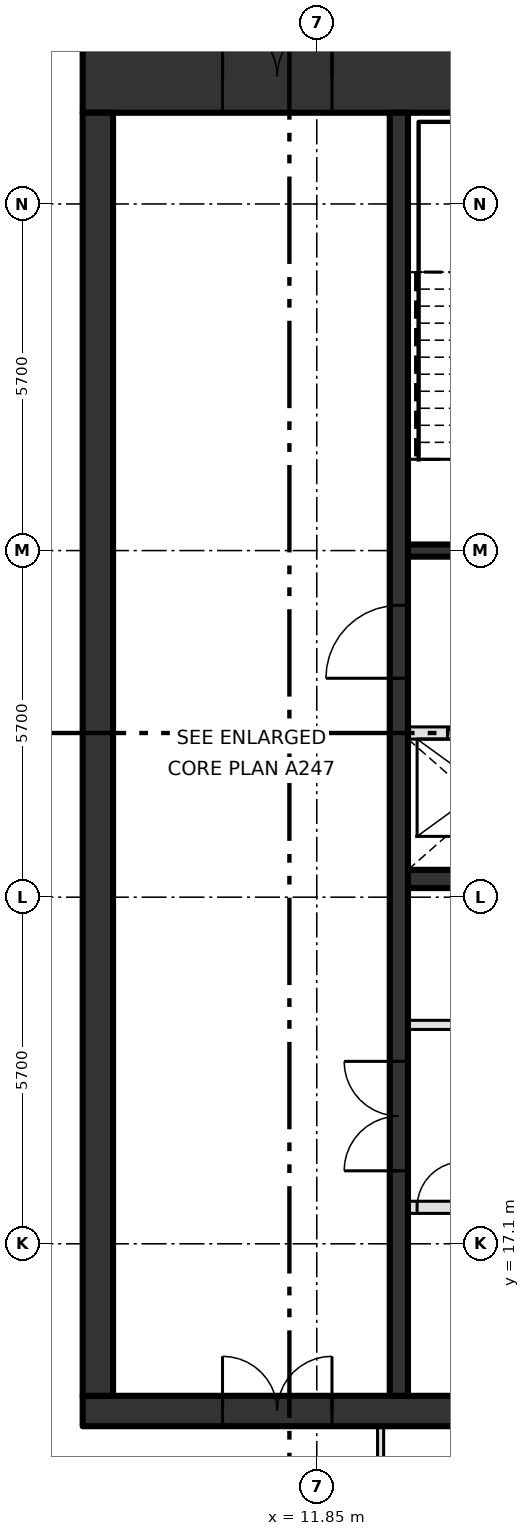
"""IFC4 building model, lengths in metres.
Left out: names, types, materials, properties, quantities, classifications, styles, units other than length and angle.
Written with IfcOpenShell. Run it as: python <this file> out.ifc"""

import sys

from ifc_helpers import new_model, si_unit, direction, frame, frame_2d, origin, place, context, subcontext, project, spatial, rectangle, extrude, element, fill, save


model = new_model("IFC4")
c1 = context("Model", 3, precision=1e-05, world=origin(), true_north=direction((0.0, 1.0)))
c2 = subcontext(c1, "Body", "Model", "MODEL_VIEW")
j1 = project(units=[si_unit("LENGTHUNIT", "METRE"), si_unit("PLANEANGLEUNIT", "RADIAN")], contexts=[c1])
p1 = place(None, origin())
s1 = spatial("IfcSite", under=j1, at=p1, CompositionType="ELEMENT")
p2 = place(p1, origin())
s2 = spatial("IfcBuilding", under=s1, at=p2, CompositionType="ELEMENT")
p3 = place(p2, frame((0.0, 0.0, 358.2)))
s3 = spatial("IfcBuildingStorey", under=s2, at=p3, CompositionType="ELEMENT", Elevation=358.2)
p4 = place(p3, frame((8.0, 14.35, -0.3), z_axis=(0.0, 0.0, 1.0), x_axis=(1.0, 0.0, 0.0)))
e1 = element("IfcWall", 1, at=p4, inside=s3, PredefinedType="SHEAR", context=c2, shape_type="SweptSolid", body=[
    extrude(rectangle(XDim=22.8, YDim=0.5, at=frame_2d((11.4, 0.0))), origin(), (0.0, 0.0, 1.0), 4.2),
])
p5 = place(p4, frame((2.3, 0.0, 0.3)))
e2 = element("IfcOpeningElement", 2, at=p5, cuts=e1, PredefinedType="OPENING", context=c2, shape_type="SweptSolid", body=[
    extrude(rectangle(XDim=1.8, YDim=2.1, at=frame_2d((0.9, 1.05))), frame((0.0, 0.26, 0.0), z_axis=(0.0, -1.0, 0.0), x_axis=(1.0, 0.0, 0.0)), (0.0, 0.0, 1.0), 0.52),
])
p6 = place(p3, frame((8.0, 36.3, -0.3), z_axis=(0.0, 0.0, 1.0), x_axis=(1.0, 0.0, 0.0)))
e3 = element("IfcWall", 3, at=p6, inside=s3, PredefinedType="SHEAR", context=c2, shape_type="SweptSolid", body=[
    extrude(rectangle(XDim=22.8, YDim=1.2, at=frame_2d((11.4, 0.0))), origin(), (0.0, 0.0, 1.0), 4.2),
])
p7 = place(p6, frame((2.3, 0.0, 0.3)))
e4 = element("IfcOpeningElement", 4, at=p7, cuts=e3, PredefinedType="OPENING", context=c2, shape_type="SweptSolid", body=[
    extrude(rectangle(XDim=1.8, YDim=2.1, at=frame_2d((0.9, 1.05))), frame((0.0, 0.61, 0.0), z_axis=(0.0, -1.0, 0.0), x_axis=(1.0, 0.0, 0.0)), (0.0, 0.0, 1.0), 1.22),
])
p8 = place(p3, frame((8.25, 14.6, -0.3), z_axis=(0.0, 0.0, 1.0), x_axis=(0.0, 1.0, 0.0)))
e5 = element("IfcWall", 5, at=p8, inside=s3, PredefinedType="SHEAR", context=c2, shape_type="SweptSolid", body=[
    extrude(rectangle(XDim=21.1, YDim=0.5, at=frame_2d((10.55, 0.0))), origin(), (0.0, 0.0, 1.0), 4.2),
])
p9 = place(p3, frame((13.35, 17.7, 0.0), z_axis=(0.0, 0.0, 1.0), x_axis=(1.0, 0.0, 0.0)))
e6 = element("IfcWall", 6, at=p9, inside=s3, PredefinedType="SOLIDWALL", context=c2, shape_type="SweptSolid", body=[
    extrude(rectangle(XDim=13.425, YDim=0.2, at=frame_2d((6.712, 0.0))), origin(), (0.0, 0.0, 1.0), 3.9),
])
p10 = place(p9, frame((2.0, 0.0, 0.0)))
e7 = element("IfcOpeningElement", 7, at=p10, cuts=e6, PredefinedType="OPENING", context=c2, shape_type="SweptSolid", body=[
    extrude(rectangle(XDim=1.1, YDim=2.1, at=frame_2d((0.55, 1.05))), frame((0.0, 0.11, 0.0), z_axis=(0.0, -1.0, 0.0), x_axis=(1.0, 0.0, 0.0)), (0.0, 0.0, 1.0), 0.22),
])
p11 = place(p9, frame((4.7, 0.0, 0.0)))
e8 = element("IfcOpeningElement", 8, at=p11, cuts=e6, PredefinedType="OPENING", context=c2, shape_type="SweptSolid", body=[
    extrude(rectangle(XDim=1.1, YDim=2.1, at=frame_2d((0.55, 1.05))), frame((0.0, 0.11, 0.0), z_axis=(0.0, -1.0, 0.0), x_axis=(1.0, 0.0, 0.0)), (0.0, 0.0, 1.0), 0.22),
])
p12 = place(p9, frame((7.4, 0.0, 0.0)))
e9 = element("IfcOpeningElement", 9, at=p12, cuts=e6, PredefinedType="OPENING", context=c2, shape_type="SweptSolid", body=[
    extrude(rectangle(XDim=1.1, YDim=2.1, at=frame_2d((0.55, 1.05))), frame((0.0, 0.11, 0.0), z_axis=(0.0, -1.0, 0.0), x_axis=(1.0, 0.0, 0.0)), (0.0, 0.0, 1.0), 0.22),
])
p13 = place(p9, frame((10.1, 0.0, 0.0)))
e10 = element("IfcOpeningElement", 10, at=p13, cuts=e6, PredefinedType="OPENING", context=c2, shape_type="SweptSolid", body=[
    extrude(rectangle(XDim=1.1, YDim=2.1, at=frame_2d((0.55, 1.05))), frame((0.0, 0.11, 0.0), z_axis=(0.0, -1.0, 0.0), x_axis=(1.0, 0.0, 0.0)), (0.0, 0.0, 1.0), 0.22),
])
p14 = place(p9, frame((0.15, 0.0, 0.0)))
e11 = element("IfcOpeningElement", 11, at=p14, cuts=e6, PredefinedType="OPENING", context=c2, shape_type="SweptSolid", body=[
    extrude(rectangle(XDim=0.75, YDim=2.1, at=frame_2d((0.375, 1.05))), frame((0.0, 0.11, 0.0), z_axis=(0.0, -1.0, 0.0), x_axis=(1.0, 0.0, 0.0)), (0.0, 0.0, 1.0), 0.22),
])
p15 = place(p9, frame((12.3, 0.0, 0.0)))
e12 = element("IfcOpeningElement", 12, at=p15, cuts=e6, PredefinedType="OPENING", context=c2, shape_type="SweptSolid", body=[
    extrude(rectangle(XDim=0.75, YDim=2.1, at=frame_2d((0.375, 1.05))), frame((0.0, 0.11, 0.0), z_axis=(0.0, -1.0, 0.0), x_axis=(1.0, 0.0, 0.0)), (0.0, 0.0, 1.0), 0.22),
])
p16 = place(p3, frame((13.35, 20.7, 0.0), z_axis=(0.0, 0.0, 1.0), x_axis=(1.0, 0.0, 0.0)))
e13 = element("IfcWall", 13, at=p16, inside=s3, PredefinedType="PARTITIONING", context=c2, shape_type="SweptSolid", body=[
    extrude(rectangle(XDim=13.425, YDim=0.15, at=frame_2d((6.712, 0.0))), origin(), (0.0, 0.0, 1.0), 3.9),
])
p17 = place(p16, frame((0.75, 0.0, 0.0)))
e14 = element("IfcOpeningElement", 14, at=p17, cuts=e13, PredefinedType="OPENING", context=c2, shape_type="SweptSolid", body=[
    extrude(rectangle(XDim=0.9, YDim=2.1, at=frame_2d((0.45, 1.05))), frame((0.0, 0.085, 0.0), z_axis=(0.0, -1.0, 0.0), x_axis=(1.0, 0.0, 0.0)), (0.0, 0.0, 1.0), 0.17),
])
p18 = place(p16, frame((7.5, 0.0, 0.0)))
e15 = element("IfcOpeningElement", 15, at=p18, cuts=e13, PredefinedType="OPENING", context=c2, shape_type="SweptSolid", body=[
    extrude(rectangle(XDim=0.9, YDim=2.1, at=frame_2d((0.45, 1.05))), frame((0.0, 0.085, 0.0), z_axis=(0.0, -1.0, 0.0), x_axis=(1.0, 0.0, 0.0)), (0.0, 0.0, 1.0), 0.17),
])
p19 = place(p3, frame((13.35, 23.1, 0.0), z_axis=(0.0, 0.0, 1.0), x_axis=(1.0, 0.0, 0.0)))
e16 = element("IfcWall", 16, at=p19, inside=s3, PredefinedType="SHEAR", context=c2, shape_type="SweptSolid", body=[
    extrude(rectangle(XDim=16.95, YDim=0.3, at=frame_2d((8.475, 0.0))), origin(), (0.0, 0.0, 1.0), 3.9),
])
p20 = place(p3, frame((13.35, 25.5, 0.0), z_axis=(0.0, 0.0, 1.0), x_axis=(1.0, 0.0, 0.0)))
e17 = element("IfcWall", 17, at=p20, inside=s3, PredefinedType="SOLIDWALL", context=c2, shape_type="SweptSolid", body=[
    extrude(rectangle(XDim=16.95, YDim=0.2, at=frame_2d((8.475, 0.0))), origin(), (0.0, 0.0, 1.0), 3.9),
])
p21 = place(p20, frame((0.65, 0.0, 0.0)))
e18 = element("IfcOpeningElement", 18, at=p21, cuts=e17, PredefinedType="OPENING", context=c2, shape_type="SweptSolid", body=[
    extrude(rectangle(XDim=1.1, YDim=2.1, at=frame_2d((0.55, 1.05))), frame((0.0, 0.11, 0.0), z_axis=(0.0, -1.0, 0.0), x_axis=(1.0, 0.0, 0.0)), (0.0, 0.0, 1.0), 0.22),
])
p22 = place(p20, frame((3.35, 0.0, 0.0)))
e19 = element("IfcOpeningElement", 19, at=p22, cuts=e17, PredefinedType="OPENING", context=c2, shape_type="SweptSolid", body=[
    extrude(rectangle(XDim=1.1, YDim=2.1, at=frame_2d((0.55, 1.05))), frame((0.0, 0.11, 0.0), z_axis=(0.0, -1.0, 0.0), x_axis=(1.0, 0.0, 0.0)), (0.0, 0.0, 1.0), 0.22),
])
p23 = place(p20, frame((6.05, 0.0, 0.0)))
e20 = element("IfcOpeningElement", 20, at=p23, cuts=e17, PredefinedType="OPENING", context=c2, shape_type="SweptSolid", body=[
    extrude(rectangle(XDim=1.1, YDim=2.1, at=frame_2d((0.55, 1.05))), frame((0.0, 0.11, 0.0), z_axis=(0.0, -1.0, 0.0), x_axis=(1.0, 0.0, 0.0)), (0.0, 0.0, 1.0), 0.22),
])
p24 = place(p20, frame((8.75, 0.0, 0.0)))
e21 = element("IfcOpeningElement", 21, at=p24, cuts=e17, PredefinedType="OPENING", context=c2, shape_type="SweptSolid", body=[
    extrude(rectangle(XDim=1.1, YDim=2.1, at=frame_2d((0.55, 1.05))), frame((0.0, 0.11, 0.0), z_axis=(0.0, -1.0, 0.0), x_axis=(1.0, 0.0, 0.0)), (0.0, 0.0, 1.0), 0.22),
])
p25 = place(p20, frame((13.0, 0.0, 0.0)))
e22 = element("IfcOpeningElement", 22, at=p25, cuts=e17, PredefinedType="OPENING", context=c2, shape_type="SweptSolid", body=[
    extrude(rectangle(XDim=0.9, YDim=2.1, at=frame_2d((0.45, 1.05))), frame((0.0, 0.11, 0.0), z_axis=(0.0, -1.0, 0.0), x_axis=(1.0, 0.0, 0.0)), (0.0, 0.0, 1.0), 0.22),
])
p26 = place(p3, frame((13.35, 28.5, 0.0), z_axis=(0.0, 0.0, 1.0), x_axis=(1.0, 0.0, 0.0)))
e23 = element("IfcWall", 23, at=p26, inside=s3, PredefinedType="SOLIDWALL", context=c2, shape_type="SweptSolid", body=[
    extrude(rectangle(XDim=6.75, YDim=0.2, at=frame_2d((3.375, 0.0))), origin(), (0.0, 0.0, 1.0), 3.9),
])
p27 = place(p26, frame((0.95, 0.0, 0.0)))
e24 = element("IfcOpeningElement", 24, at=p27, cuts=e23, PredefinedType="OPENING", context=c2, shape_type="SweptSolid", body=[
    extrude(rectangle(XDim=1.2, YDim=2.1, at=frame_2d((0.6, 1.05))), frame((0.0, 0.11, 0.0), z_axis=(0.0, -1.0, 0.0), x_axis=(1.0, 0.0, 0.0)), (0.0, 0.0, 1.0), 0.22),
])
p28 = place(p26, frame((3.75, 0.0, 0.0)))
e25 = element("IfcOpeningElement", 25, at=p28, cuts=e23, PredefinedType="OPENING", context=c2, shape_type="SweptSolid", body=[
    extrude(rectangle(XDim=1.1, YDim=2.1, at=frame_2d((0.55, 1.05))), frame((0.0, 0.11, 0.0), z_axis=(0.0, -1.0, 0.0), x_axis=(1.0, 0.0, 0.0)), (0.0, 0.0, 1.0), 0.22),
])
p29 = place(p3, frame((13.2, 14.6, 0.0), z_axis=(0.0, 0.0, 1.0), x_axis=(0.0, 1.0, 0.0)))
e26 = element("IfcWall", 26, at=p29, inside=s3, PredefinedType="SHEAR", context=c2, shape_type="SweptSolid", body=[
    extrude(rectangle(XDim=21.1, YDim=0.3, at=frame_2d((10.55, 0.0))), origin(), (0.0, 0.0, 1.0), 3.9),
])
p30 = place(p29, frame((3.7, 0.0, 0.0)))
e27 = element("IfcOpeningElement", 27, at=p30, cuts=e26, PredefinedType="OPENING", context=c2, shape_type="SweptSolid", body=[
    extrude(rectangle(XDim=1.8, YDim=2.1, at=frame_2d((0.9, 1.05))), frame((0.0, 0.16, 0.0), z_axis=(0.0, -1.0, 0.0), x_axis=(1.0, 0.0, 0.0)), (0.0, 0.0, 1.0), 0.32),
])
p31 = place(p29, frame((11.8, 0.0, 0.0)))
e28 = element("IfcOpeningElement", 28, at=p31, cuts=e26, PredefinedType="OPENING", context=c2, shape_type="SweptSolid", body=[
    extrude(rectangle(XDim=1.2, YDim=2.1, at=frame_2d((0.6, 1.05))), frame((0.0, 0.16, 0.0), z_axis=(0.0, -1.0, 0.0), x_axis=(1.0, 0.0, 0.0)), (0.0, 0.0, 1.0), 0.32),
])
p32 = place(p3, frame((12.9, 10.078, 0.0), z_axis=(0.0, 0.0, 1.0), x_axis=(0.0, 1.0, 0.0)))
e29 = element("IfcWall", 29, at=p32, inside=s3, PredefinedType="PARTITIONING", context=c2, shape_type="SweptSolid", body=[
    extrude(rectangle(XDim=4.022, YDim=0.1, at=frame_2d((2.011, 0.0))), origin(), (0.0, 0.0, 1.0), 3.9),
])
p33 = place(p21, origin())
e30 = element("IfcDoor", 30, at=p33, inside=s3, OperationType="SLIDING_TO_LEFT", PredefinedType="DOOR", context=c2, shape_type="SweptSolid", body=[
    extrude(rectangle(XDim=1.1, YDim=2.1, at=frame_2d((0.55, 1.05))), frame((0.0, 0.025, 0.0), z_axis=(0.0, -1.0, 0.0), x_axis=(1.0, 0.0, 0.0)), (0.0, 0.0, 1.0), 0.05),
])
fill(e18, e30)
p34 = place(p14, origin())
e31 = element("IfcDoor", 31, at=p34, inside=s3, OperationType="SINGLE_SWING_RIGHT", PredefinedType="DOOR", context=c2, shape_type="SweptSolid", body=[
    extrude(rectangle(XDim=0.75, YDim=2.1, at=frame_2d((0.375, 1.05))), frame((0.0, 0.025, 0.0), z_axis=(0.0, -1.0, 0.0), x_axis=(1.0, 0.0, 0.0)), (0.0, 0.0, 1.0), 0.05),
])
fill(e11, e31)
p35 = place(p30, origin())
e32 = element("IfcDoor", 32, at=p35, inside=s3, OperationType="DOUBLE_DOOR_SINGLE_SWING", PredefinedType="DOOR", context=c2, shape_type="SweptSolid", body=[
    extrude(rectangle(XDim=1.8, YDim=2.1, at=frame_2d((0.9, 1.05))), frame((0.0, 0.025, 0.0), z_axis=(0.0, -1.0, 0.0), x_axis=(1.0, 0.0, 0.0)), (0.0, 0.0, 1.0), 0.05),
])
fill(e27, e32)
p36 = place(p31, origin())
e33 = element("IfcDoor", 33, at=p36, inside=s3, OperationType="SINGLE_SWING_LEFT", PredefinedType="DOOR", context=c2, shape_type="SweptSolid", body=[
    extrude(rectangle(XDim=1.2, YDim=2.1, at=frame_2d((0.6, 1.05))), frame((0.0, 0.025, 0.0), z_axis=(0.0, -1.0, 0.0), x_axis=(1.0, 0.0, 0.0)), (0.0, 0.0, 1.0), 0.05),
])
fill(e28, e33)
p37 = place(p7, origin())
e34 = element("IfcDoor", 34, at=p37, inside=s3, OperationType="DOUBLE_DOOR_SINGLE_SWING", PredefinedType="DOOR", context=c2, shape_type="SweptSolid", body=[
    extrude(rectangle(XDim=1.8, YDim=2.1, at=frame_2d((0.9, 1.05))), frame((0.0, 0.025, 0.0), z_axis=(0.0, -1.0, 0.0), x_axis=(1.0, 0.0, 0.0)), (0.0, 0.0, 1.0), 0.05),
])
fill(e4, e34)
p38 = place(p5, origin())
e35 = element("IfcDoor", 35, at=p38, inside=s3, OperationType="DOUBLE_DOOR_SINGLE_SWING", PredefinedType="DOOR", context=c2, shape_type="SweptSolid", body=[
    extrude(rectangle(XDim=1.8, YDim=2.1, at=frame_2d((0.9, 1.05))), frame((0.0, 0.025, 0.0), z_axis=(0.0, -1.0, 0.0), x_axis=(1.0, 0.0, 0.0)), (0.0, 0.0, 1.0), 0.05),
])
fill(e2, e35)
save(model, sys.argv[1])
